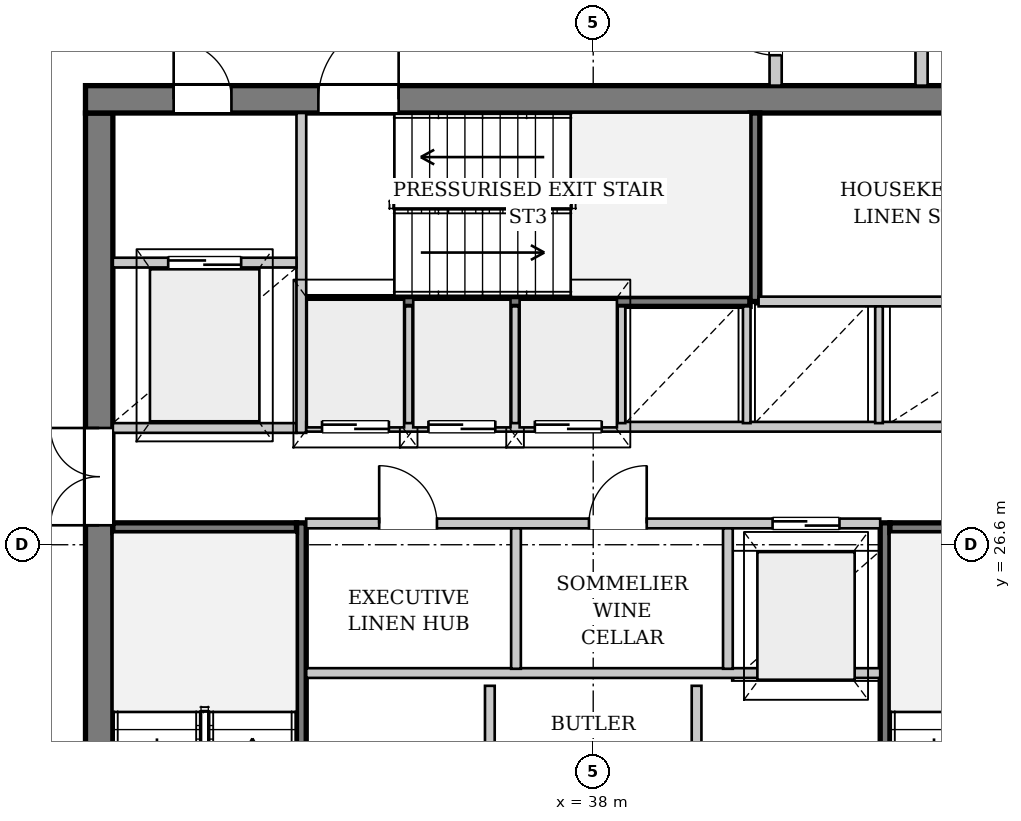
"""IFC4 building model, lengths in metres.
Left out: names, types, materials, properties, quantities, classifications, styles, units other than length and angle.
Written with IfcOpenShell. Run it as: python <this file> out.ifc"""

import sys

from ifc_helpers import new_model, si_unit, direction, frame, frame_2d, origin, place, context, subcontext, project, spatial, rectangle, extrude, source, transform, mapped, element, fill, save


model = new_model("IFC4")
c1 = context("Model", 3, precision=1e-05, world=origin(), true_north=direction((0.0, 1.0)))
c2 = subcontext(c1, "Body", "Model", "MODEL_VIEW")
j1 = project(units=[si_unit("LENGTHUNIT", "METRE"), si_unit("PLANEANGLEUNIT", "RADIAN")], contexts=[c1])
p1 = place(None, origin())
s1 = spatial("IfcSite", under=j1, at=p1, CompositionType="ELEMENT")
p2 = place(p1, origin())
s2 = spatial("IfcBuilding", under=s1, at=p2, CompositionType="ELEMENT")
p3 = place(p2, frame((0.0, 0.0, 270.5)))
s3 = spatial("IfcBuildingStorey", under=s2, at=p3, CompositionType="ELEMENT", Elevation=270.5)
p4 = place(p3, frame((29.49, 13.021, 0.0), z_axis=(0.0, 0.0, 1.0), x_axis=(-0.778476594197, 0.627673635169, 0.0)))
e1 = element("IfcWall", 1, at=p4, inside=s3, PredefinedType="SOLIDWALL", context=c2, shape_type="SweptSolid", body=[
    extrude(rectangle(XDim=17.256, YDim=0.32, at=frame_2d((8.628, 0.0))), origin(), (0.0, 0.0, 1.0), 2.872),
])
p5 = place(p4, frame((6.372, 0.0, 0.0)))
e2 = element("IfcOpeningElement", 2, at=p5, cuts=e1, PredefinedType="OPENING", context=c2, shape_type="SweptSolid", body=[
    extrude(rectangle(XDim=1.5, YDim=2.3, at=frame_2d((0.75, 1.15))), frame((0.0, 0.17, 0.0), z_axis=(0.0, -1.0, 0.0), x_axis=(1.0, 0.0, 0.0)), (0.0, 0.0, 1.0), 0.34),
])
p6 = place(p4, frame((11.47, 0.0, 0.402)))
e3 = element("IfcOpeningElement", 3, at=p6, cuts=e1, PredefinedType="OPENING", context=c2, shape_type="SweptSolid", body=[
    extrude(rectangle(XDim=2.6, YDim=2.35, at=frame_2d((1.3, 1.175))), frame((0.0, 0.17, 0.0), z_axis=(0.0, -1.0, 0.0), x_axis=(1.0, 0.0, 0.0)), (0.0, 0.0, 1.0), 0.34),
])
p7 = place(p3, frame((16.066, 25.875, 0.0), z_axis=(0.0, 0.0, 1.0), x_axis=(0.785693730349, 0.61861568206, 0.0)))
e4 = element("IfcWall", 4, at=p7, inside=s3, PredefinedType="SOLIDWALL", context=c2, shape_type="SweptSolid", body=[
    extrude(rectangle(XDim=21.675, YDim=0.38, at=frame_2d((10.837, 0.0))), origin(), (0.0, 0.0, 1.0), 2.872),
])
p8 = place(p7, frame((4.969, 0.0, 0.502)))
e5 = element("IfcOpeningElement", 5, at=p8, cuts=e4, PredefinedType="OPENING", context=c2, shape_type="SweptSolid", body=[
    extrude(rectangle(XDim=2.2, YDim=2.25, at=frame_2d((1.1, 1.125))), frame((0.0, 0.2, 0.0), z_axis=(0.0, -1.0, 0.0), x_axis=(1.0, 0.0, 0.0)), (0.0, 0.0, 1.0), 0.4),
])
p9 = place(p7, frame((17.506, 0.0, 0.502)))
e6 = element("IfcOpeningElement", 6, at=p9, cuts=e4, PredefinedType="OPENING", context=c2, shape_type="SweptSolid", body=[
    extrude(rectangle(XDim=2.2, YDim=2.25, at=frame_2d((1.1, 1.125))), frame((0.0, 0.2, 0.0), z_axis=(0.0, -1.0, 0.0), x_axis=(1.0, 0.0, 0.0)), (0.0, 0.0, 1.0), 0.4),
])
p10 = place(p3, frame((29.875, 19.5, 0.0), z_axis=(0.0, 0.0, 1.0), x_axis=(0.0, 1.0, 0.0)))
e7 = element("IfcWall", 7, at=p10, inside=s3, PredefinedType="SHEAR", context=c2, shape_type="SweptSolid", body=[
    extrude(rectangle(XDim=14.2, YDim=0.45, at=frame_2d((7.1, 0.0))), origin(), (0.0, 0.0, 1.0), 3.38),
])
p11 = place(p10, frame((7.42, 0.0, 0.0)))
e8 = element("IfcOpeningElement", 8, at=p11, cuts=e7, PredefinedType="OPENING", context=c2, shape_type="SweptSolid", body=[
    extrude(rectangle(XDim=1.6, YDim=2.2, at=frame_2d((0.8, 1.1))), frame((0.0, 0.235, 0.0), z_axis=(0.0, -1.0, 0.0), x_axis=(1.0, 0.0, 0.0)), (0.0, 0.0, 1.0), 0.47),
])
p12 = place(p3, frame((29.65, 33.925, 0.0), z_axis=(0.0, 0.0, 1.0), x_axis=(1.0, 0.0, 0.0)))
e9 = element("IfcWall", 9, at=p12, inside=s3, PredefinedType="SHEAR", context=c2, shape_type="SweptSolid", body=[
    extrude(rectangle(XDim=16.7, YDim=0.45, at=frame_2d((8.35, 0.0))), origin(), (0.0, 0.0, 1.0), 3.38),
])
p13 = place(p12, frame((1.45, 0.0, 0.0)))
e10 = element("IfcOpeningElement", 10, at=p13, cuts=e9, PredefinedType="OPENING", context=c2, shape_type="SweptSolid", body=[
    extrude(rectangle(XDim=0.95, YDim=2.1, at=frame_2d((0.475, 1.05))), frame((0.0, 0.235, 0.0), z_axis=(0.0, -1.0, 0.0), x_axis=(1.0, 0.0, 0.0)), (0.0, 0.0, 1.0), 0.47),
])
p14 = place(p12, frame((3.83, 0.0, 0.0)))
e11 = element("IfcOpeningElement", 11, at=p14, cuts=e9, PredefinedType="OPENING", context=c2, shape_type="SweptSolid", body=[
    extrude(rectangle(XDim=1.32, YDim=2.2, at=frame_2d((0.66, 1.1))), frame((0.0, 0.235, 0.0), z_axis=(0.0, -1.0, 0.0), x_axis=(1.0, 0.0, 0.0)), (0.0, 0.0, 1.0), 0.47),
])
p15 = place(p3, frame((33.2, 19.5, 0.0), z_axis=(0.0, 0.0, 1.0), x_axis=(0.0, 1.0, 0.0)))
e12 = element("IfcWall", 12, at=p15, inside=s3, PredefinedType="PARTITIONING", context=c2, shape_type="SweptSolid", body=[
    extrude(rectangle(XDim=7.46, YDim=0.16, at=frame_2d((3.73, 0.0))), origin(), (0.0, 0.0, 1.0), 3.38),
])
p16 = place(p15, frame((0.08, 0.0, 0.0)))
e13 = element("IfcOpeningElement", 13, at=p16, cuts=e12, PredefinedType="OPENING", context=c2, shape_type="SweptSolid", body=[
    extrude(rectangle(XDim=1.32, YDim=2.2, at=frame_2d((0.66, 1.1))), frame((0.0, 0.09, 0.0), z_axis=(0.0, -1.0, 0.0), x_axis=(1.0, 0.0, 0.0)), (0.0, 0.0, 1.0), 0.18),
])
p17 = place(p3, frame((30.1, 26.88, 0.0), z_axis=(0.0, 0.0, 1.0), x_axis=(1.0, 0.0, 0.0)))
e14 = element("IfcWall", 14, at=p17, inside=s3, PredefinedType="PARTITIONING", context=c2, shape_type="SweptSolid", body=[
    extrude(rectangle(XDim=3.02, YDim=0.16, at=frame_2d((1.51, 0.0))), origin(), (0.0, 0.0, 1.0), 3.38),
])
p18 = place(p3, frame((42.8, 26.96, 0.0), z_axis=(0.0, 0.0, 1.0), x_axis=(0.0, -1.0, 0.0)))
e15 = element("IfcWall", 15, at=p18, inside=s3, PredefinedType="PARTITIONING", context=c2, shape_type="SweptSolid", body=[
    extrude(rectangle(XDim=7.46, YDim=0.16, at=frame_2d((3.73, 0.0))), origin(), (0.0, 0.0, 1.0), 3.38),
])
p19 = place(p18, frame((6.06, 0.0, 0.0)))
e16 = element("IfcOpeningElement", 16, at=p19, cuts=e15, PredefinedType="OPENING", context=c2, shape_type="SweptSolid", body=[
    extrude(rectangle(XDim=1.32, YDim=2.2, at=frame_2d((0.66, 1.1))), frame((0.0, 0.09, 0.0), z_axis=(0.0, -1.0, 0.0), x_axis=(1.0, 0.0, 0.0)), (0.0, 0.0, 1.0), 0.18),
])
p20 = place(p3, frame((42.88, 26.88, 0.0), z_axis=(0.0, 0.0, 1.0), x_axis=(1.0, 0.0, 0.0)))
e17 = element("IfcWall", 17, at=p20, inside=s3, PredefinedType="PARTITIONING", context=c2, shape_type="SweptSolid", body=[
    extrude(rectangle(XDim=3.02, YDim=0.16, at=frame_2d((1.51, 0.0))), origin(), (0.0, 0.0, 1.0), 3.38),
])
p21 = place(p3, frame((33.28, 30.6, 0.0), z_axis=(0.0, 0.0, 1.0), x_axis=(1.0, 0.0, 0.0)))
e18 = element("IfcWall", 18, at=p21, inside=s3, PredefinedType="PARTITIONING", context=c2, shape_type="SweptSolid", body=[
    extrude(rectangle(XDim=7.3, YDim=0.16, at=frame_2d((3.65, 0.0))), origin(), (0.0, 0.0, 1.0), 3.38),
])
p22 = place(p3, frame((40.66, 30.6, 0.0), z_axis=(0.0, 0.0, 1.0), x_axis=(0.0, 1.0, 0.0)))
e19 = element("IfcWall", 19, at=p22, inside=s3, PredefinedType="PARTITIONING", context=c2, shape_type="SweptSolid", body=[
    extrude(rectangle(XDim=3.1, YDim=0.16, at=frame_2d((1.55, 0.0))), origin(), (0.0, 0.0, 1.0), 3.38),
])
p23 = place(p3, frame((36.3, 19.5, 0.0), z_axis=(0.0, 0.0, 1.0), x_axis=(0.0, 1.0, 0.0)))
e20 = element("IfcWall", 20, at=p23, inside=s3, PredefinedType="PARTITIONING", context=c2, shape_type="SweptSolid", body=[
    extrude(rectangle(XDim=4.78, YDim=0.16, at=frame_2d((2.39, 0.0))), origin(), (0.0, 0.0, 1.0), 3.38),
])
p24 = place(p23, frame((0.6, 0.0, 0.0)))
e21 = element("IfcOpeningElement", 21, at=p24, cuts=e20, PredefinedType="OPENING", context=c2, shape_type="SweptSolid", body=[
    extrude(rectangle(XDim=1.2, YDim=2.2, at=frame_2d((0.6, 1.1))), frame((0.0, 0.09, 0.0), z_axis=(0.0, -1.0, 0.0), x_axis=(1.0, 0.0, 0.0)), (0.0, 0.0, 1.0), 0.18),
])
p25 = place(p23, frame((2.65, 0.0, 0.0)))
e22 = element("IfcOpeningElement", 22, at=p25, cuts=e20, PredefinedType="OPENING", context=c2, shape_type="SweptSolid", body=[
    extrude(rectangle(XDim=0.95, YDim=2.1, at=frame_2d((0.475, 1.05))), frame((0.0, 0.09, 0.0), z_axis=(0.0, -1.0, 0.0), x_axis=(1.0, 0.0, 0.0)), (0.0, 0.0, 1.0), 0.18),
])
p26 = place(p3, frame((39.7, 24.28, 0.0), z_axis=(0.0, 0.0, 1.0), x_axis=(0.0, -1.0, 0.0)))
e23 = element("IfcWall", 23, at=p26, inside=s3, PredefinedType="PARTITIONING", context=c2, shape_type="SweptSolid", body=[
    extrude(rectangle(XDim=4.78, YDim=0.16, at=frame_2d((2.39, 0.0))), origin(), (0.0, 0.0, 1.0), 3.38),
])
p27 = place(p26, frame((3.12, 0.0, 0.0)))
e24 = element("IfcOpeningElement", 24, at=p27, cuts=e23, PredefinedType="OPENING", context=c2, shape_type="SweptSolid", body=[
    extrude(rectangle(XDim=1.2, YDim=2.2, at=frame_2d((0.6, 1.1))), frame((0.0, 0.09, 0.0), z_axis=(0.0, -1.0, 0.0), x_axis=(1.0, 0.0, 0.0)), (0.0, 0.0, 1.0), 0.18),
])
p28 = place(p3, frame((33.28, 24.49, 0.0), z_axis=(0.0, 0.0, 1.0), x_axis=(1.0, 0.0, 0.0)))
e25 = element("IfcWall", 25, at=p28, inside=s3, PredefinedType="PARTITIONING", context=c2, shape_type="SweptSolid", body=[
    extrude(rectangle(XDim=9.44, YDim=0.16, at=frame_2d((4.72, 0.0))), origin(), (0.0, 0.0, 1.0), 3.38),
])
p29 = place(p3, frame((30.1, 28.52, 0.0), z_axis=(0.0, 0.0, 1.0), x_axis=(1.0, 0.0, 0.0)))
e26 = element("IfcWall", 26, at=p29, inside=s3, PredefinedType="PARTITIONING", context=c2, shape_type="SweptSolid", body=[
    extrude(rectangle(XDim=3.02, YDim=0.16, at=frame_2d((1.51, 0.0))), origin(), (0.0, 0.0, 1.0), 3.38),
])
p30 = place(p3, frame((33.2, 28.44, 0.0), z_axis=(0.0, 0.0, 1.0), x_axis=(0.0, 1.0, 0.0)))
e27 = element("IfcWall", 27, at=p30, inside=s3, PredefinedType="PARTITIONING", context=c2, shape_type="SweptSolid", body=[
    extrude(rectangle(XDim=5.26, YDim=0.16, at=frame_2d((2.63, 0.0))), origin(), (0.0, 0.0, 1.0), 3.38),
])
p31 = place(p3, frame((30.1, 31.24, 0.0), z_axis=(0.0, 0.0, 1.0), x_axis=(1.0, 0.0, 0.0)))
e28 = element("IfcWall", 28, at=p31, inside=s3, PredefinedType="PARTITIONING", context=c2, shape_type="SweptSolid", body=[
    extrude(rectangle(XDim=3.02, YDim=0.16, at=frame_2d((1.51, 0.0))), origin(), (0.0, 0.0, 1.0), 3.38),
])
p32 = place(p31, frame((0.91, 0.0, 0.0)))
e29 = element("IfcOpeningElement", 29, at=p32, cuts=e28, PredefinedType="OPENING", context=c2, shape_type="SweptSolid", body=[
    extrude(rectangle(XDim=1.2, YDim=2.2, at=frame_2d((0.6, 1.1))), frame((0.0, 0.09, 0.0), z_axis=(0.0, -1.0, 0.0), x_axis=(1.0, 0.0, 0.0)), (0.0, 0.0, 1.0), 0.18),
])
p33 = place(p3, frame((33.28, 26.95, 0.0), z_axis=(0.0, 0.0, 1.0), x_axis=(1.0, 0.0, 0.0)))
e30 = element("IfcWall", 30, at=p33, inside=s3, PredefinedType="PARTITIONING", context=c2, shape_type="SweptSolid", body=[
    extrude(rectangle(XDim=9.44, YDim=0.16, at=frame_2d((4.72, 0.0))), origin(), (0.0, 0.0, 1.0), 3.38),
])
p34 = place(p33, frame((1.2, 0.0, 0.0)))
e31 = element("IfcOpeningElement", 31, at=p34, cuts=e30, PredefinedType="OPENING", context=c2, shape_type="SweptSolid", body=[
    extrude(rectangle(XDim=0.95, YDim=2.1, at=frame_2d((0.475, 1.05))), frame((0.0, 0.09, 0.0), z_axis=(0.0, -1.0, 0.0), x_axis=(1.0, 0.0, 0.0)), (0.0, 0.0, 1.0), 0.18),
])
p35 = place(p33, frame((4.65, 0.0, 0.0)))
e32 = element("IfcOpeningElement", 32, at=p35, cuts=e30, PredefinedType="OPENING", context=c2, shape_type="SweptSolid", body=[
    extrude(rectangle(XDim=0.95, YDim=2.1, at=frame_2d((0.475, 1.05))), frame((0.0, 0.09, 0.0), z_axis=(0.0, -1.0, 0.0), x_axis=(1.0, 0.0, 0.0)), (0.0, 0.0, 1.0), 0.18),
])
p36 = place(p33, frame((7.67, 0.0, 0.0)))
e33 = element("IfcOpeningElement", 33, at=p36, cuts=e30, PredefinedType="OPENING", context=c2, shape_type="SweptSolid", body=[
    extrude(rectangle(XDim=1.1, YDim=2.2, at=frame_2d((0.55, 1.1))), frame((0.0, 0.09, 0.0), z_axis=(0.0, -1.0, 0.0), x_axis=(1.0, 0.0, 0.0)), (0.0, 0.0, 1.0), 0.18),
])
for number, where, z_axis, x_axis in (
    (34, (36.73, 24.56, 0.0), (0.0, 0.0, 1.0), (0.0, 1.0, 0.0)),
    (35, (40.215, 24.56, 0.0), (0.0, 0.0, 1.0), (0.0, 1.0, 0.0)),
):
    element("IfcWall", number, at=place(p3, frame(where, z_axis=z_axis, x_axis=x_axis)), inside=s3, PredefinedType="PARTITIONING", context=c2, shape_type="SweptSolid", body=[
        extrude(rectangle(XDim=2.31, YDim=0.16, at=frame_2d((1.155, 0.0))), origin(), (0.0, 0.0, 1.0), 3.38),
    ])
p37 = place(p3, frame((33.28, 28.54, 0.0), z_axis=(0.0, 0.0, 1.0), x_axis=(1.0, 0.0, 0.0)))
e36 = element("IfcWall", 36, at=p37, inside=s3, PredefinedType="PARTITIONING", context=c2, shape_type="SweptSolid", body=[
    extrude(rectangle(XDim=12.62, YDim=0.16, at=frame_2d((6.31, 0.0))), origin(), (0.0, 0.0, 1.0), 3.38),
])
p38 = place(p37, frame((0.26, 0.0, 0.0)))
e37 = element("IfcOpeningElement", 37, at=p38, cuts=e36, PredefinedType="OPENING", context=c2, shape_type="SweptSolid", body=[
    extrude(rectangle(XDim=1.1, YDim=2.2, at=frame_2d((0.55, 1.1))), frame((0.0, 0.09, 0.0), z_axis=(0.0, -1.0, 0.0), x_axis=(1.0, 0.0, 0.0)), (0.0, 0.0, 1.0), 0.18),
])
p39 = place(p37, frame((2.01, 0.0, 0.0)))
e38 = element("IfcOpeningElement", 38, at=p39, cuts=e36, PredefinedType="OPENING", context=c2, shape_type="SweptSolid", body=[
    extrude(rectangle(XDim=1.1, YDim=2.2, at=frame_2d((0.55, 1.1))), frame((0.0, 0.09, 0.0), z_axis=(0.0, -1.0, 0.0), x_axis=(1.0, 0.0, 0.0)), (0.0, 0.0, 1.0), 0.18),
])
p40 = place(p37, frame((3.76, 0.0, 0.0)))
e39 = element("IfcOpeningElement", 39, at=p40, cuts=e36, PredefinedType="OPENING", context=c2, shape_type="SweptSolid", body=[
    extrude(rectangle(XDim=1.1, YDim=2.2, at=frame_2d((0.55, 1.1))), frame((0.0, 0.09, 0.0), z_axis=(0.0, -1.0, 0.0), x_axis=(1.0, 0.0, 0.0)), (0.0, 0.0, 1.0), 0.18),
])
p41 = place(p3, frame((40.72, 30.6, 0.0), z_axis=(0.0, 0.0, 1.0), x_axis=(1.0, 0.0, 0.0)))
e40 = element("IfcWall", 40, at=p41, inside=s3, PredefinedType="PARTITIONING", context=c2, shape_type="SweptSolid", body=[
    extrude(rectangle(XDim=5.18, YDim=0.16, at=frame_2d((2.59, 0.0))), origin(), (0.0, 0.0, 1.0), 3.38),
])
for number, where, z_axis, x_axis in (
    (41, (34.965, 28.6, 0.0), (0.0, 0.0, 1.0), (0.0, 1.0, 0.0)),
    (42, (36.715, 28.6, 0.0), (0.0, 0.0, 1.0), (0.0, 1.0, 0.0)),
    (43, (38.465, 28.6, 0.0), (0.0, 0.0, 1.0), (0.0, 1.0, 0.0)),
    (44, (40.525, 28.6, 0.0), (0.0, 0.0, 1.0), (0.0, 1.0, 0.0)),
    (45, (42.7, 28.6, 0.0), (0.0, 0.0, 1.0), (0.0, 1.0, 0.0)),
):
    element("IfcWall", number, at=place(p3, frame(where, z_axis=z_axis, x_axis=x_axis)), inside=s3, PredefinedType="PARTITIONING", context=c2, shape_type="SweptSolid", body=[
        extrude(rectangle(XDim=1.92, YDim=0.125, at=frame_2d((0.96, 0.0))), origin(), (0.0, 0.0, 1.0), 3.38),
    ])
p42 = place(p3, frame((41.0, 34.15, 0.0), z_axis=(0.0, 0.0, 1.0), x_axis=(0.0, 1.0, 0.0)))
e46 = element("IfcWall", 46, at=p42, inside=s3, PredefinedType="PARTITIONING", context=c2, shape_type="SweptSolid", body=[
    extrude(rectangle(XDim=1.85, YDim=0.2, at=frame_2d((0.925, 0.0))), origin(), (0.0, 0.0, 1.0), 3.38),
])
p43 = place(p42, frame((0.5, 0.0, 0.0)))
e47 = element("IfcOpeningElement", 47, at=p43, cuts=e46, PredefinedType="OPENING", context=c2, shape_type="SweptSolid", body=[
    extrude(rectangle(XDim=1.05, YDim=2.2, at=frame_2d((0.525, 1.1))), frame((0.0, 0.11, 0.0), z_axis=(0.0, -1.0, 0.0), x_axis=(1.0, 0.0, 0.0)), (0.0, 0.0, 1.0), 0.22),
])
p44 = place(p3, frame((43.4, 34.15, 0.0), z_axis=(0.0, 0.0, 1.0), x_axis=(0.0, 1.0, 0.0)))
e48 = element("IfcWall", 48, at=p44, inside=s3, PredefinedType="PARTITIONING", context=c2, shape_type="SweptSolid", body=[
    extrude(rectangle(XDim=1.85, YDim=0.2, at=frame_2d((0.925, 0.0))), origin(), (0.0, 0.0, 1.0), 3.055),
])
m1 = source(origin(), c2, "Body", "SweptSolid", [
    extrude(rectangle(XDim=1.6, YDim=2.2, at=frame_2d((0.8, 1.1))), frame((0.0, 0.025, 0.0), z_axis=(0.0, -1.0, 0.0), x_axis=(1.0, 0.0, 0.0)), (0.0, 0.0, 1.0), 0.05),
])
p45 = place(p11, origin())
e49 = element("IfcDoor", 49, at=p45, inside=s3, OperationType="DOUBLE_DOOR_SINGLE_SWING", PredefinedType="DOOR", context=c2, shape_type="MappedRepresentation", body=[
    mapped(m1, transform((0.0, 0.0, 0.0), x_axis=(1.0, 0.0, 0.0), y_axis=(0.0, 1.0, 0.0), z_axis=(0.0, 0.0, 1.0), scale=1.0)),
])
fill(e8, e49)
m2 = source(origin(), c2, "Body", "SweptSolid", [
    extrude(rectangle(XDim=0.95, YDim=2.1, at=frame_2d((0.475, 1.05))), frame((0.0, 0.025, 0.0), z_axis=(0.0, -1.0, 0.0), x_axis=(1.0, 0.0, 0.0)), (0.0, 0.0, 1.0), 0.05),
])
p46 = place(p13, origin())
e50 = element("IfcDoor", 50, at=p46, inside=s3, OperationType="SINGLE_SWING_LEFT", PredefinedType="DOOR", context=c2, shape_type="MappedRepresentation", body=[
    mapped(m2, transform((0.0, 0.0, 0.0), x_axis=(1.0, 0.0, 0.0), y_axis=(0.0, 1.0, 0.0), z_axis=(0.0, 0.0, 1.0), scale=1.0)),
])
fill(e10, e50)
m3 = source(origin(), c2, "Body", "SweptSolid", [
    extrude(rectangle(XDim=1.32, YDim=2.2, at=frame_2d((0.66, 1.1))), frame((0.0, 0.025, 0.0), z_axis=(0.0, -1.0, 0.0), x_axis=(1.0, 0.0, 0.0)), (0.0, 0.0, 1.0), 0.05),
])
p47 = place(p14, origin())
e51 = element("IfcDoor", 51, at=p47, inside=s3, OperationType="SINGLE_SWING_RIGHT", PredefinedType="DOOR", context=c2, shape_type="MappedRepresentation", body=[
    mapped(m3, transform((0.0, 0.0, 0.0), x_axis=(1.0, 0.0, 0.0), y_axis=(0.0, 1.0, 0.0), z_axis=(0.0, 0.0, 1.0), scale=1.0)),
])
fill(e11, e51)
m4 = source(origin(), c2, "Body", "SweptSolid", [
    extrude(rectangle(XDim=1.2, YDim=2.2, at=frame_2d((0.6, 1.1))), frame((0.0, 0.025, 0.0), z_axis=(0.0, -1.0, 0.0), x_axis=(1.0, 0.0, 0.0)), (0.0, 0.0, 1.0), 0.05),
])
p48 = place(p32, origin())
e52 = element("IfcDoor", 52, at=p48, inside=s3, OperationType="DOUBLE_DOOR_SLIDING", PredefinedType="DOOR", context=c2, shape_type="MappedRepresentation", body=[
    mapped(m4, transform((0.0, 0.0, 0.0), x_axis=(1.0, 0.0, 0.0), y_axis=(0.0, 1.0, 0.0), z_axis=(0.0, 0.0, 1.0), scale=1.0)),
])
fill(e29, e52)
p49 = place(p34, origin())
e53 = element("IfcDoor", 53, at=p49, inside=s3, OperationType="SINGLE_SWING_LEFT", PredefinedType="DOOR", context=c2, shape_type="MappedRepresentation", body=[
    mapped(m2, transform((0.0, 0.0, 0.0), x_axis=(1.0, 0.0, 0.0), y_axis=(0.0, 1.0, 0.0), z_axis=(0.0, 0.0, 1.0), scale=1.0)),
])
fill(e31, e53)
p50 = place(p35, origin())
e54 = element("IfcDoor", 54, at=p50, inside=s3, OperationType="SINGLE_SWING_RIGHT", PredefinedType="DOOR", context=c2, shape_type="MappedRepresentation", body=[
    mapped(m2, transform((0.0, 0.0, 0.0), x_axis=(1.0, 0.0, 0.0), y_axis=(0.0, 1.0, 0.0), z_axis=(0.0, 0.0, 1.0), scale=1.0)),
])
fill(e32, e54)
m5 = source(origin(), c2, "Body", "SweptSolid", [
    extrude(rectangle(XDim=1.1, YDim=2.2, at=frame_2d((0.55, 1.1))), frame((0.0, 0.025, 0.0), z_axis=(0.0, -1.0, 0.0), x_axis=(1.0, 0.0, 0.0)), (0.0, 0.0, 1.0), 0.05),
])
p51 = place(p36, origin())
e55 = element("IfcDoor", 55, at=p51, inside=s3, OperationType="DOUBLE_DOOR_SLIDING", PredefinedType="DOOR", context=c2, shape_type="MappedRepresentation", body=[
    mapped(m5, transform((0.0, 0.0, 0.0), x_axis=(1.0, 0.0, 0.0), y_axis=(0.0, 1.0, 0.0), z_axis=(0.0, 0.0, 1.0), scale=1.0)),
])
fill(e33, e55)
p52 = place(p38, origin())
e56 = element("IfcDoor", 56, at=p52, inside=s3, OperationType="DOUBLE_DOOR_SLIDING", PredefinedType="DOOR", context=c2, shape_type="MappedRepresentation", body=[
    mapped(m5, transform((0.0, 0.0, 0.0), x_axis=(1.0, 0.0, 0.0), y_axis=(0.0, 1.0, 0.0), z_axis=(0.0, 0.0, 1.0), scale=1.0)),
])
fill(e37, e56)
p53 = place(p39, origin())
e57 = element("IfcDoor", 57, at=p53, inside=s3, OperationType="DOUBLE_DOOR_SLIDING", PredefinedType="DOOR", context=c2, shape_type="MappedRepresentation", body=[
    mapped(m5, transform((0.0, 0.0, 0.0), x_axis=(1.0, 0.0, 0.0), y_axis=(0.0, 1.0, 0.0), z_axis=(0.0, 0.0, 1.0), scale=1.0)),
])
fill(e38, e57)
p54 = place(p40, origin())
e58 = element("IfcDoor", 58, at=p54, inside=s3, OperationType="DOUBLE_DOOR_SLIDING", PredefinedType="DOOR", context=c2, shape_type="MappedRepresentation", body=[
    mapped(m5, transform((0.0, 0.0, 0.0), x_axis=(1.0, 0.0, 0.0), y_axis=(0.0, 1.0, 0.0), z_axis=(0.0, 0.0, 1.0), scale=1.0)),
])
fill(e39, e58)
m6 = source(origin(), c2, "Body", "SweptSolid", [
    extrude(rectangle(XDim=1.05, YDim=2.2, at=frame_2d((0.525, 1.1))), frame((0.0, 0.025, 0.0), z_axis=(0.0, -1.0, 0.0), x_axis=(1.0, 0.0, 0.0)), (0.0, 0.0, 1.0), 0.05),
])
p55 = place(p43, origin())
e59 = element("IfcDoor", 59, at=p55, inside=s3, OperationType="SINGLE_SWING_RIGHT", PredefinedType="DOOR", context=c2, shape_type="MappedRepresentation", body=[
    mapped(m6, transform((0.0, 0.0, 0.0), x_axis=(1.0, 0.0, 0.0), y_axis=(0.0, 1.0, 0.0), z_axis=(0.0, 0.0, 1.0), scale=1.0)),
])
fill(e47, e59)
save(model, sys.argv[1])
